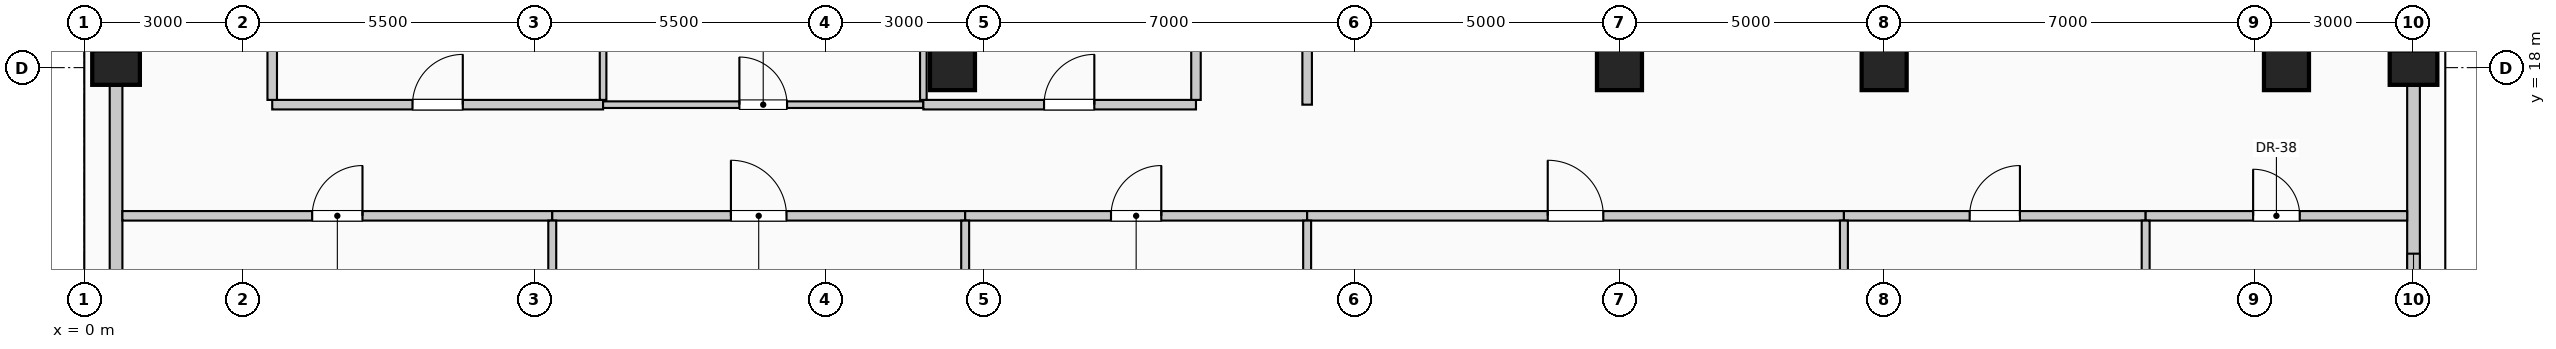
"""IFC4 building model, lengths in metres.
Left out: names, types, materials, properties, quantities, classifications, styles, units other than length and angle.
Written with IfcOpenShell. Run it as: python <this file> out.ifc"""

import sys

from ifc_helpers import new_model, si_unit, direction, frame, frame_2d, origin, origin_2d, place, context, subcontext, project, spatial, rectangle, circle, extrude, element, fill, save


model = new_model("IFC4")
c1 = context("Model", 3, precision=1e-05, world=origin(), true_north=direction((0.0, 1.0)))
c2 = subcontext(c1, "Body", "Model", "MODEL_VIEW")
j1 = project(units=[si_unit("LENGTHUNIT", "METRE"), si_unit("PLANEANGLEUNIT", "RADIAN")], contexts=[c1])
p1 = place(None, origin())
s1 = spatial("IfcSite", under=j1, at=p1, CompositionType="ELEMENT")
p2 = place(p1, origin())
s2 = spatial("IfcBuilding", under=s1, at=p2, CompositionType="ELEMENT")
p3 = place(p2, frame((0.0, 0.0, 293.0)))
s3 = spatial("IfcBuildingStorey", under=s2, at=p3, CompositionType="ELEMENT", Elevation=293.0)
for number, where, z_axis, x_axis in (
    (1, (0.6, 18.0, 0.0), (0.0, 0.0, 1.0), (0.0, 1.0, 0.0)),
    (2, (44.0, 18.0, 0.0), (0.0, 0.0, 1.0), (0.0, 1.0, 0.0)),
):
    element("IfcColumn", number, at=place(p3, frame(where, z_axis=z_axis, x_axis=x_axis)), inside=s3, PredefinedType="COLUMN", context=c2, shape_type="SweptSolid", body=[
        extrude(rectangle(XDim=0.65, YDim=0.9, at=origin_2d()), origin(), (0.0, 0.0, 1.0), 4.0),
    ])
for number, where, z_axis, x_axis in (
    (3, (16.4, 18.0, 0.0), (0.0, 0.0, 1.0), (1.0, 0.0, 0.0)),
    (4, (29.0, 18.0, 0.0), (0.0, 0.0, 1.0), (1.0, 0.0, 0.0)),
    (5, (41.6, 18.0, 0.0), (0.0, 0.0, 1.0), (1.0, 0.0, 0.0)),
    (6, (34.0, 18.0, 0.0), (0.0, 0.0, 1.0), (1.0, 0.0, 0.0)),
):
    element("IfcColumn", number, at=place(p3, frame(where, z_axis=z_axis, x_axis=x_axis)), inside=s3, PredefinedType="COLUMN", context=c2, shape_type="SweptSolid", body=[
        extrude(circle(Radius=0.425, at=origin_2d()), origin(), (0.0, 0.0, 1.0), 4.0),
    ])
p4 = place(p3, frame((0.6, 10.345, 0.0), z_axis=(0.0, 0.0, 1.0), x_axis=(0.0, 1.0, 0.0)))
e7 = element("IfcWall", 7, at=p4, inside=s3, PredefinedType="SOLIDWALL", context=c2, shape_type="SweptSolid", body=[
    extrude(rectangle(XDim=7.31, YDim=0.24, at=frame_2d((3.655, 0.0))), origin(), (0.0, 0.0, 1.0), 3.025),
])
p5 = place(p4, frame((1.037, 0.0, 0.35)))
e8 = element("IfcOpeningElement", 8, at=p5, cuts=e7, PredefinedType="OPENING", context=c2, shape_type="SweptSolid", body=[
    extrude(rectangle(XDim=2.1, YDim=2.2, at=frame_2d((1.05, 1.1))), frame((0.0, 0.13, 0.0), z_axis=(0.0, -1.0, 0.0), x_axis=(1.0, 0.0, 0.0)), (0.0, 0.0, 1.0), 0.26),
])
p6 = place(p3, frame((44.0, 17.655, 0.0), z_axis=(0.0, 0.0, 1.0), x_axis=(0.0, -1.0, 0.0)))
e9 = element("IfcWall", 9, at=p6, inside=s3, PredefinedType="SOLIDWALL", context=c2, shape_type="SweptSolid", body=[
    extrude(rectangle(XDim=13.71, YDim=0.24, at=frame_2d((6.855, 0.0))), origin(), (0.0, 0.0, 1.0), 3.015),
])
p7 = place(p6, frame((3.17, 0.0, 0.35)))
e10 = element("IfcOpeningElement", 10, at=p7, cuts=e9, PredefinedType="OPENING", context=c2, shape_type="SweptSolid", body=[
    extrude(rectangle(XDim=2.1, YDim=2.2, at=frame_2d((1.05, 1.1))), frame((0.0, 0.13, 0.0), z_axis=(0.0, -1.0, 0.0), x_axis=(1.0, 0.0, 0.0)), (0.0, 0.0, 1.0), 0.26),
])
p8 = place(p6, frame((8.44, 0.0, 0.35)))
e11 = element("IfcOpeningElement", 11, at=p8, cuts=e9, PredefinedType="OPENING", context=c2, shape_type="SweptSolid", body=[
    extrude(rectangle(XDim=2.1, YDim=2.2, at=frame_2d((1.05, 1.1))), frame((0.0, 0.13, 0.0), z_axis=(0.0, -1.0, 0.0), x_axis=(1.0, 0.0, 0.0)), (0.0, 0.0, 1.0), 0.26),
])
p9 = place(p3, frame((0.72, 15.2, 0.0), z_axis=(0.0, 0.0, 1.0), x_axis=(1.0, 0.0, 0.0)))
e12 = element("IfcWall", 12, at=p9, inside=s3, PredefinedType="PARTITIONING", context=c2, shape_type="SweptSolid", body=[
    extrude(rectangle(XDim=8.12, YDim=0.18, at=frame_2d((4.06, 0.0))), origin(), (0.0, 0.0, 1.0), 3.775),
])
p10 = place(p9, frame((3.585, 0.0, 0.0)))
e13 = element("IfcOpeningElement", 13, at=p10, cuts=e12, PredefinedType="OPENING", context=c2, shape_type="SweptSolid", body=[
    extrude(rectangle(XDim=0.95, YDim=2.15, at=frame_2d((0.475, 1.075))), frame((0.0, 0.1, 0.0), z_axis=(0.0, -1.0, 0.0), x_axis=(1.0, 0.0, 0.0)), (0.0, 0.0, 1.0), 0.2),
])
p11 = place(p3, frame((8.84, 15.2, 0.0), z_axis=(0.0, 0.0, 1.0), x_axis=(1.0, 0.0, 0.0)))
e14 = element("IfcWall", 14, at=p11, inside=s3, PredefinedType="PARTITIONING", context=c2, shape_type="SweptSolid", body=[
    extrude(rectangle(XDim=7.8, YDim=0.18, at=frame_2d((3.9, 0.0))), origin(), (0.0, 0.0, 1.0), 3.775),
])
p12 = place(p11, frame((3.375, 0.0, 0.0)))
e15 = element("IfcOpeningElement", 15, at=p12, cuts=e14, PredefinedType="OPENING", context=c2, shape_type="SweptSolid", body=[
    extrude(rectangle(XDim=1.05, YDim=2.15, at=frame_2d((0.525, 1.075))), frame((0.0, 0.1, 0.0), z_axis=(0.0, -1.0, 0.0), x_axis=(1.0, 0.0, 0.0)), (0.0, 0.0, 1.0), 0.2),
])
p13 = place(p3, frame((16.64, 15.2, 0.0), z_axis=(0.0, 0.0, 1.0), x_axis=(1.0, 0.0, 0.0)))
e16 = element("IfcWall", 16, at=p13, inside=s3, PredefinedType="PARTITIONING", context=c2, shape_type="SweptSolid", body=[
    extrude(rectangle(XDim=6.46, YDim=0.18, at=frame_2d((3.23, 0.0))), origin(), (0.0, 0.0, 1.0), 3.775),
])
p14 = place(p13, frame((2.755, 0.0, 0.0)))
e17 = element("IfcOpeningElement", 17, at=p14, cuts=e16, PredefinedType="OPENING", context=c2, shape_type="SweptSolid", body=[
    extrude(rectangle(XDim=0.95, YDim=2.15, at=frame_2d((0.475, 1.075))), frame((0.0, 0.1, 0.0), z_axis=(0.0, -1.0, 0.0), x_axis=(1.0, 0.0, 0.0)), (0.0, 0.0, 1.0), 0.2),
])
p15 = place(p3, frame((23.1, 15.2, 0.0), z_axis=(0.0, 0.0, 1.0), x_axis=(1.0, 0.0, 0.0)))
e18 = element("IfcWall", 18, at=p15, inside=s3, PredefinedType="PARTITIONING", context=c2, shape_type="SweptSolid", body=[
    extrude(rectangle(XDim=10.14, YDim=0.18, at=frame_2d((5.07, 0.0))), origin(), (0.0, 0.0, 1.0), 3.775),
])
p16 = place(p15, frame((4.545, 0.0, 0.0)))
e19 = element("IfcOpeningElement", 19, at=p16, cuts=e18, PredefinedType="OPENING", context=c2, shape_type="SweptSolid", body=[
    extrude(rectangle(XDim=1.05, YDim=2.15, at=frame_2d((0.525, 1.075))), frame((0.0, 0.1, 0.0), z_axis=(0.0, -1.0, 0.0), x_axis=(1.0, 0.0, 0.0)), (0.0, 0.0, 1.0), 0.2),
])
p17 = place(p3, frame((33.24, 15.2, 0.0), z_axis=(0.0, 0.0, 1.0), x_axis=(1.0, 0.0, 0.0)))
e20 = element("IfcWall", 20, at=p17, inside=s3, PredefinedType="PARTITIONING", context=c2, shape_type="SweptSolid", body=[
    extrude(rectangle(XDim=5.7, YDim=0.18, at=frame_2d((2.85, 0.0))), origin(), (0.0, 0.0, 1.0), 3.775),
])
p18 = place(p17, frame((2.375, 0.0, 0.0)))
e21 = element("IfcOpeningElement", 21, at=p18, cuts=e20, PredefinedType="OPENING", context=c2, shape_type="SweptSolid", body=[
    extrude(rectangle(XDim=0.95, YDim=2.15, at=frame_2d((0.475, 1.075))), frame((0.0, 0.1, 0.0), z_axis=(0.0, -1.0, 0.0), x_axis=(1.0, 0.0, 0.0)), (0.0, 0.0, 1.0), 0.2),
])
p19 = place(p3, frame((38.94, 15.2, 0.0), z_axis=(0.0, 0.0, 1.0), x_axis=(1.0, 0.0, 0.0)))
e22 = element("IfcWall", 22, at=p19, inside=s3, PredefinedType="PARTITIONING", context=c2, shape_type="SweptSolid", body=[
    extrude(rectangle(XDim=4.94, YDim=0.18, at=frame_2d((2.47, 0.0))), origin(), (0.0, 0.0, 1.0), 3.775),
])
p20 = place(p19, frame((2.03, 0.0, 0.0)))
e23 = element("IfcOpeningElement", 23, at=p20, cuts=e22, PredefinedType="OPENING", context=c2, shape_type="SweptSolid", body=[
    extrude(rectangle(XDim=0.88, YDim=2.1, at=frame_2d((0.44, 1.05))), frame((0.0, 0.1, 0.0), z_axis=(0.0, -1.0, 0.0), x_axis=(1.0, 0.0, 0.0)), (0.0, 0.0, 1.0), 0.2),
])
p21 = place(p3, frame((3.55, 17.3, 0.0), z_axis=(0.0, 0.0, 1.0), x_axis=(1.0, 0.0, 0.0)))
e24 = element("IfcWall", 24, at=p21, inside=s3, PredefinedType="PARTITIONING", context=c2, shape_type="SweptSolid", body=[
    extrude(rectangle(XDim=6.25, YDim=0.18, at=frame_2d((3.125, 0.0))), origin(), (0.0, 0.0, 1.0), 3.775),
])
p22 = place(p21, frame((2.65, 0.0, 0.0)))
e25 = element("IfcOpeningElement", 25, at=p22, cuts=e24, PredefinedType="OPENING", context=c2, shape_type="SweptSolid", body=[
    extrude(rectangle(XDim=0.95, YDim=2.15, at=frame_2d((0.475, 1.075))), frame((0.0, 0.1, 0.0), z_axis=(0.0, -1.0, 0.0), x_axis=(1.0, 0.0, 0.0)), (0.0, 0.0, 1.0), 0.2),
])
p23 = place(p3, frame((9.8, 17.3, 0.0), z_axis=(0.0, 0.0, 1.0), x_axis=(1.0, 0.0, 0.0)))
e26 = element("IfcWall", 26, at=p23, inside=s3, PredefinedType="PARTITIONING", context=c2, shape_type="SweptSolid", body=[
    extrude(rectangle(XDim=6.05, YDim=0.125, at=frame_2d((3.025, 0.0))), origin(), (0.0, 0.0, 1.0), 3.775),
])
p24 = place(p23, frame((2.575, 0.0, 0.0)))
e27 = element("IfcOpeningElement", 27, at=p24, cuts=e26, PredefinedType="OPENING", context=c2, shape_type="SweptSolid", body=[
    extrude(rectangle(XDim=0.9, YDim=2.1, at=frame_2d((0.45, 1.05))), frame((0.0, 0.073, 0.0), z_axis=(0.0, -1.0, 0.0), x_axis=(1.0, 0.0, 0.0)), (0.0, 0.0, 1.0), 0.145),
])
p25 = place(p3, frame((15.85, 17.3, 0.0), z_axis=(0.0, 0.0, 1.0), x_axis=(1.0, 0.0, 0.0)))
e28 = element("IfcWall", 28, at=p25, inside=s3, PredefinedType="PARTITIONING", context=c2, shape_type="SweptSolid", body=[
    extrude(rectangle(XDim=5.15, YDim=0.18, at=frame_2d((2.575, 0.0))), origin(), (0.0, 0.0, 1.0), 3.775),
])
p26 = place(p25, frame((2.28, 0.0, 0.0)))
e29 = element("IfcOpeningElement", 29, at=p26, cuts=e28, PredefinedType="OPENING", context=c2, shape_type="SweptSolid", body=[
    extrude(rectangle(XDim=0.95, YDim=2.15, at=frame_2d((0.475, 1.075))), frame((0.0, 0.1, 0.0), z_axis=(0.0, -1.0, 0.0), x_axis=(1.0, 0.0, 0.0)), (0.0, 0.0, 1.0), 0.2),
])
p27 = place(p3, frame((3.55, 17.39, 0.0), z_axis=(0.0, 0.0, 1.0), x_axis=(0.0, 1.0, 0.0)))
e30 = element("IfcWall", 30, at=p27, inside=s3, PredefinedType="PARTITIONING", context=c2, shape_type="SweptSolid", body=[
    extrude(rectangle(XDim=7.335, YDim=0.18, at=frame_2d((3.667, 0.0))), origin(), (0.0, 0.0, 1.0), 3.775),
])
p28 = place(p3, frame((8.84, 1.05, 0.0), z_axis=(0.0, 0.0, 1.0), x_axis=(0.0, 1.0, 0.0)))
e31 = element("IfcWall", 31, at=p28, inside=s3, PredefinedType="PARTITIONING", context=c2, shape_type="SweptSolid", body=[
    extrude(rectangle(XDim=14.06, YDim=0.15, at=frame_2d((7.03, 0.0))), origin(), (0.0, 0.0, 1.0), 3.775),
])
for number, where, z_axis, x_axis in (
    (32, (9.8, 17.39, 0.0), (0.0, 0.0, 1.0), (0.0, 1.0, 0.0)),
    (33, (15.85, 17.39, 0.0), (0.0, 0.0, 1.0), (0.0, 1.0, 0.0)),
):
    element("IfcWall", number, at=place(p3, frame(where, z_axis=z_axis, x_axis=x_axis)), inside=s3, PredefinedType="PARTITIONING", context=c2, shape_type="SweptSolid", body=[
        extrude(rectangle(XDim=7.335, YDim=0.125, at=frame_2d((3.667, 0.0))), origin(), (0.0, 0.0, 1.0), 3.775),
    ])
p29 = place(p3, frame((16.64, 1.05, 0.0), z_axis=(0.0, 0.0, 1.0), x_axis=(0.0, 1.0, 0.0)))
e34 = element("IfcWall", 34, at=p29, inside=s3, PredefinedType="PARTITIONING", context=c2, shape_type="SweptSolid", body=[
    extrude(rectangle(XDim=14.06, YDim=0.15, at=frame_2d((7.03, 0.0))), origin(), (0.0, 0.0, 1.0), 3.27),
])
p30 = place(p3, frame((21.0, 17.39, 0.0), z_axis=(0.0, 0.0, 1.0), x_axis=(0.0, 1.0, 0.0)))
e35 = element("IfcWall", 35, at=p30, inside=s3, PredefinedType="PARTITIONING", context=c2, shape_type="SweptSolid", body=[
    extrude(rectangle(XDim=7.335, YDim=0.18, at=frame_2d((3.667, 0.0))), origin(), (0.0, 0.0, 1.0), 3.775),
])
p31 = place(p3, frame((23.1, 0.72, 0.0), z_axis=(0.0, 0.0, 1.0), x_axis=(0.0, 1.0, 0.0)))
e36 = element("IfcWall", 36, at=p31, inside=s3, PredefinedType="PARTITIONING", context=c2, shape_type="SweptSolid", body=[
    extrude(rectangle(XDim=14.39, YDim=0.15, at=frame_2d((7.195, 0.0))), origin(), (0.0, 0.0, 1.0), 3.775),
])
p32 = place(p3, frame((23.1, 17.3, 0.0), z_axis=(0.0, 0.0, 1.0), x_axis=(0.0, 1.0, 0.0)))
e37 = element("IfcWall", 37, at=p32, inside=s3, PredefinedType="PARTITIONING", context=c2, shape_type="SweptSolid", body=[
    extrude(rectangle(XDim=11.025, YDim=0.18, at=frame_2d((5.512, 0.0))), origin(), (0.0, 0.0, 1.0), 3.775),
])
p33 = place(p32, frame((5.038, 0.0, 0.0)))
e38 = element("IfcOpeningElement", 38, at=p33, cuts=e37, PredefinedType="OPENING", context=c2, shape_type="SweptSolid", body=[
    extrude(rectangle(XDim=0.95, YDim=2.15, at=frame_2d((0.475, 1.075))), frame((0.0, 0.1, 0.0), z_axis=(0.0, -1.0, 0.0), x_axis=(1.0, 0.0, 0.0)), (0.0, 0.0, 1.0), 0.2),
])
for number, where, z_axis, x_axis in (
    (39, (33.24, 0.72, 0.0), (0.0, 0.0, 1.0), (0.0, 1.0, 0.0)),
    (40, (38.94, 0.72, 0.0), (0.0, 0.0, 1.0), (0.0, 1.0, 0.0)),
):
    element("IfcWall", number, at=place(p3, frame(where, z_axis=z_axis, x_axis=x_axis)), inside=s3, PredefinedType="PARTITIONING", context=c2, shape_type="SweptSolid", body=[
        extrude(rectangle(XDim=14.39, YDim=0.15, at=frame_2d((7.195, 0.0))), origin(), (0.0, 0.0, 1.0), 3.775),
    ])
p34 = place(p7, origin())
e41 = element("IfcWindow", 41, at=p34, inside=s3, PartitioningType="SINGLE_PANEL", PredefinedType="WINDOW", context=c2, shape_type="SweptSolid", body=[
    extrude(rectangle(XDim=2.1, YDim=2.2, at=frame_2d((1.05, 1.1))), frame((0.0, 0.03, 0.0), z_axis=(0.0, -1.0, 0.0), x_axis=(1.0, 0.0, 0.0)), (0.0, 0.0, 1.0), 0.06),
])
fill(e10, e41)
p35 = place(p10, origin())
e42 = element("IfcDoor", 42, at=p35, inside=s3, OperationType="SINGLE_SWING_RIGHT", PredefinedType="DOOR", context=c2, shape_type="SweptSolid", body=[
    extrude(rectangle(XDim=0.95, YDim=2.15, at=frame_2d((0.475, 1.075))), frame((0.0, 0.025, 0.0), z_axis=(0.0, -1.0, 0.0), x_axis=(1.0, 0.0, 0.0)), (0.0, 0.0, 1.0), 0.05),
])
fill(e13, e42)
p36 = place(p12, origin())
e43 = element("IfcDoor", 43, at=p36, inside=s3, OperationType="SINGLE_SWING_LEFT", PredefinedType="DOOR", context=c2, shape_type="SweptSolid", body=[
    extrude(rectangle(XDim=1.05, YDim=2.15, at=frame_2d((0.525, 1.075))), frame((0.0, 0.025, 0.0), z_axis=(0.0, -1.0, 0.0), x_axis=(1.0, 0.0, 0.0)), (0.0, 0.0, 1.0), 0.05),
])
fill(e15, e43)
p37 = place(p14, origin())
e44 = element("IfcDoor", 44, at=p37, inside=s3, OperationType="SINGLE_SWING_RIGHT", PredefinedType="DOOR", context=c2, shape_type="SweptSolid", body=[
    extrude(rectangle(XDim=0.95, YDim=2.15, at=frame_2d((0.475, 1.075))), frame((0.0, 0.025, 0.0), z_axis=(0.0, -1.0, 0.0), x_axis=(1.0, 0.0, 0.0)), (0.0, 0.0, 1.0), 0.05),
])
fill(e17, e44)
p38 = place(p16, origin())
e45 = element("IfcDoor", 45, at=p38, inside=s3, OperationType="SINGLE_SWING_LEFT", PredefinedType="DOOR", context=c2, shape_type="SweptSolid", body=[
    extrude(rectangle(XDim=1.05, YDim=2.15, at=frame_2d((0.525, 1.075))), frame((0.0, 0.025, 0.0), z_axis=(0.0, -1.0, 0.0), x_axis=(1.0, 0.0, 0.0)), (0.0, 0.0, 1.0), 0.05),
])
fill(e19, e45)
p39 = place(p18, origin())
e46 = element("IfcDoor", 46, at=p39, inside=s3, OperationType="SINGLE_SWING_RIGHT", PredefinedType="DOOR", context=c2, shape_type="SweptSolid", body=[
    extrude(rectangle(XDim=0.95, YDim=2.15, at=frame_2d((0.475, 1.075))), frame((0.0, 0.025, 0.0), z_axis=(0.0, -1.0, 0.0), x_axis=(1.0, 0.0, 0.0)), (0.0, 0.0, 1.0), 0.05),
])
fill(e21, e46)
p40 = place(p20, origin())
e47 = element("IfcDoor", 47, at=p40, inside=s3, OperationType="SINGLE_SWING_LEFT", PredefinedType="DOOR", context=c2, shape_type="SweptSolid", body=[
    extrude(rectangle(XDim=0.88, YDim=2.1, at=frame_2d((0.44, 1.05))), frame((0.0, 0.025, 0.0), z_axis=(0.0, -1.0, 0.0), x_axis=(1.0, 0.0, 0.0)), (0.0, 0.0, 1.0), 0.05),
])
fill(e23, e47)
p41 = place(p22, origin())
e48 = element("IfcDoor", 48, at=p41, inside=s3, OperationType="SINGLE_SWING_RIGHT", PredefinedType="DOOR", context=c2, shape_type="SweptSolid", body=[
    extrude(rectangle(XDim=0.95, YDim=2.15, at=frame_2d((0.475, 1.075))), frame((0.0, 0.025, 0.0), z_axis=(0.0, -1.0, 0.0), x_axis=(1.0, 0.0, 0.0)), (0.0, 0.0, 1.0), 0.05),
])
fill(e25, e48)
p42 = place(p24, origin())
e49 = element("IfcDoor", 49, at=p42, inside=s3, OperationType="SINGLE_SWING_LEFT", PredefinedType="DOOR", context=c2, shape_type="SweptSolid", body=[
    extrude(rectangle(XDim=0.9, YDim=2.1, at=frame_2d((0.45, 1.05))), frame((0.0, 0.025, 0.0), z_axis=(0.0, -1.0, 0.0), x_axis=(1.0, 0.0, 0.0)), (0.0, 0.0, 1.0), 0.05),
])
fill(e27, e49)
p43 = place(p26, origin())
e50 = element("IfcDoor", 50, at=p43, inside=s3, OperationType="SINGLE_SWING_RIGHT", PredefinedType="DOOR", context=c2, shape_type="SweptSolid", body=[
    extrude(rectangle(XDim=0.95, YDim=2.15, at=frame_2d((0.475, 1.075))), frame((0.0, 0.025, 0.0), z_axis=(0.0, -1.0, 0.0), x_axis=(1.0, 0.0, 0.0)), (0.0, 0.0, 1.0), 0.05),
])
fill(e29, e50)
save(model, sys.argv[1])
